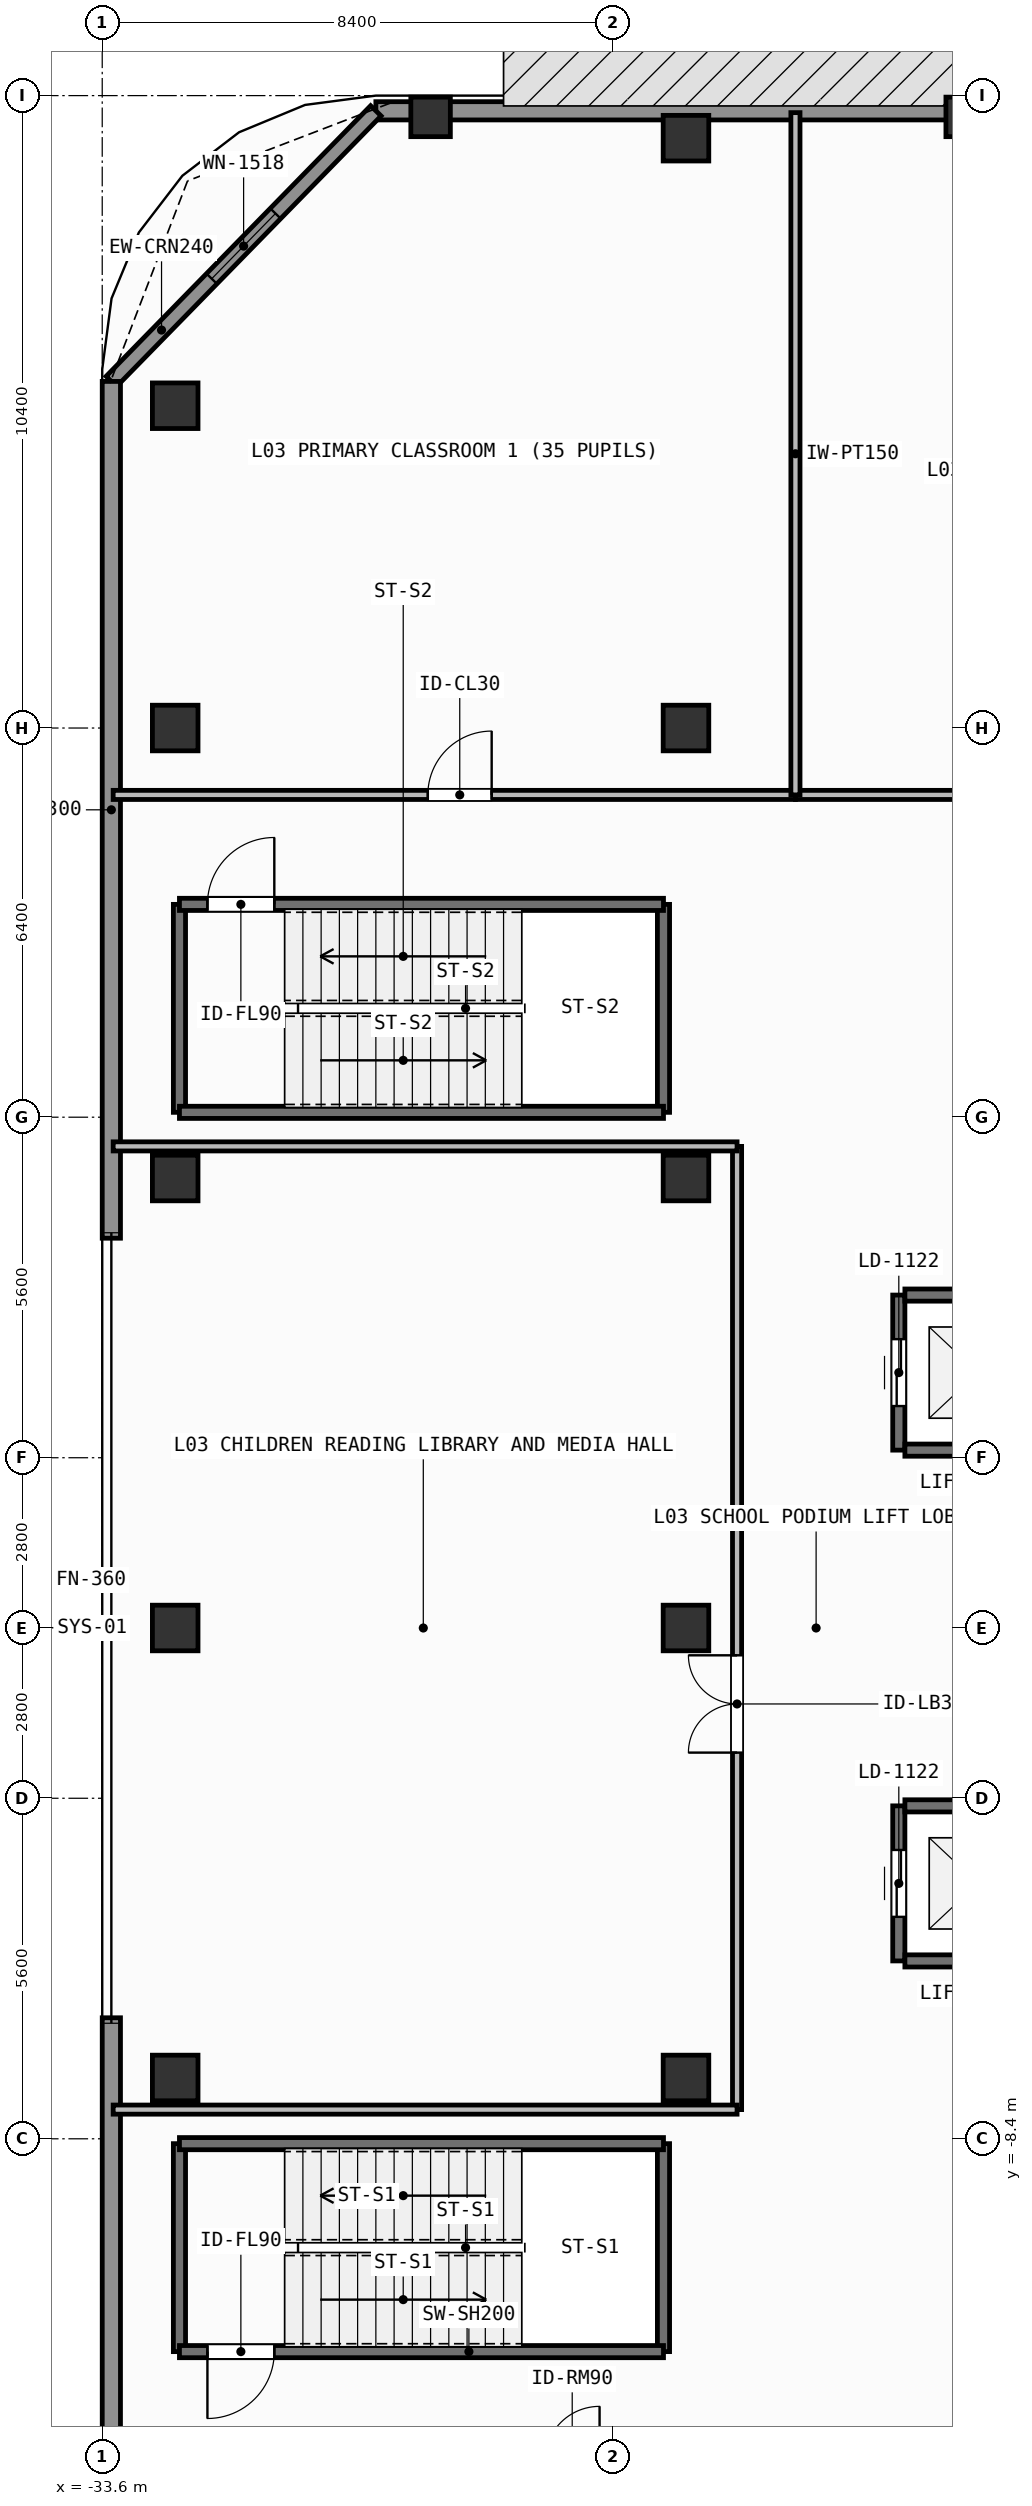
"""IFC4 building model, lengths in metres.
Left out: names, types, materials, properties, quantities, classifications, styles, units other than length and angle.
Written with IfcOpenShell. Run it as: python <this file> out.ifc"""

import sys

from ifc_helpers import new_model, si_unit, direction, frame, frame_2d, origin, origin_2d, place, context, subcontext, project, spatial, rectangle, extrude, element, fill, save


model = new_model("IFC4")
c1 = context("Model", 3, precision=1e-05, world=origin(), true_north=direction((0.0, 1.0)))
c2 = subcontext(c1, "Body", "Model", "MODEL_VIEW")
j1 = project(units=[si_unit("LENGTHUNIT", "METRE"), si_unit("PLANEANGLEUNIT", "RADIAN")], contexts=[c1])
p1 = place(None, origin())
s1 = spatial("IfcSite", under=j1, at=p1, CompositionType="ELEMENT")
p2 = place(p1, origin())
s2 = spatial("IfcBuilding", under=s1, at=p2, CompositionType="ELEMENT")
p3 = place(p2, frame((0.0, 0.0, 9.0)))
s3 = spatial("IfcBuildingStorey", under=s2, at=p3, CompositionType="ELEMENT", Elevation=9.0)
for number, where, z_axis, x_axis in (
    (1, (-32.4, -7.4, 0.0), (0.0, 0.0, 1.0), (1.0, 0.0, 0.0)),
    (2, (-32.4, 0.0, 0.0), (0.0, 0.0, 1.0), (1.0, 0.0, 0.0)),
    (3, (-32.4, 7.4, 0.0), (0.0, 0.0, 1.0), (1.0, 0.0, 0.0)),
    (4, (-32.4, 14.8, 0.0), (0.0, 0.0, 1.0), (1.0, 0.0, 0.0)),
    (5, (-24.0, -7.4, 0.0), (0.0, 0.0, 1.0), (1.0, 0.0, 0.0)),
    (6, (-24.0, 0.0, 0.0), (0.0, 0.0, 1.0), (1.0, 0.0, 0.0)),
    (7, (-24.0, 7.4, 0.0), (0.0, 0.0, 1.0), (1.0, 0.0, 0.0)),
    (8, (-24.0, 14.8, 0.0), (0.0, 0.0, 1.0), (1.0, 0.0, 0.0)),
    (9, (-24.0, 24.5, 0.0), (0.0, 0.0, 1.0), (1.0, 0.0, 0.0)),
    (10, (-32.4, 20.1, 0.0), (0.0, 0.0, 1.0), (1.0, 0.0, 0.0)),
):
    element("IfcColumn", number, at=place(p3, frame(where, z_axis=z_axis, x_axis=x_axis)), inside=s3, PredefinedType="COLUMN", context=c2, shape_type="SweptSolid", body=[
        extrude(rectangle(XDim=0.75, YDim=0.75, at=origin_2d()), origin(), (0.0, 0.0, 1.0), 4.2),
    ])
for number, where, z_axis, x_axis in (
    (11, (-28.2, 24.85, 0.0), (0.0, 0.0, 1.0), (1.0, 0.0, 0.0)),
    (12, (-19.4, 24.85, 0.0), (0.0, 0.0, 1.0), (1.0, 0.0, 0.0)),
):
    element("IfcColumn", number, at=place(p3, frame(where, z_axis=z_axis, x_axis=x_axis)), inside=s3, PredefinedType="PILASTER", context=c2, shape_type="SweptSolid", body=[
        extrude(rectangle(XDim=0.65, YDim=0.65, at=origin_2d()), origin(), (0.0, 0.0, 1.0), 4.2),
    ])
p4 = place(p3, frame((-29.1, 24.95, 0.0), z_axis=(0.0, 0.0, 1.0), x_axis=(1.0, 0.0, 0.0)))
e13 = element("IfcWall", 13, at=p4, inside=s3, PredefinedType="SOLIDWALL", context=c2, shape_type="SweptSolid", body=[
    extrude(rectangle(XDim=58.2, YDim=0.3, at=frame_2d((29.1, 0.0))), origin(), (0.0, 0.0, 1.0), 3.96),
])
p5 = place(p4, frame((24.35, 0.0, 0.85)))
e14 = element("IfcOpeningElement", 14, at=p5, cuts=e13, PredefinedType="OPENING", context=c2, shape_type="SweptSolid", body=[
    extrude(rectangle(XDim=2.1, YDim=2.2, at=frame_2d((1.05, 1.1))), frame((0.0, 0.16, 0.0), z_axis=(0.0, -1.0, 0.0), x_axis=(1.0, 0.0, 0.0)), (0.0, 0.0, 1.0), 0.32),
])
p6 = place(p4, frame((31.75, 0.0, 0.85)))
e15 = element("IfcOpeningElement", 15, at=p6, cuts=e13, PredefinedType="OPENING", context=c2, shape_type="SweptSolid", body=[
    extrude(rectangle(XDim=2.1, YDim=2.2, at=frame_2d((1.05, 1.1))), frame((0.0, 0.16, 0.0), z_axis=(0.0, -1.0, 0.0), x_axis=(1.0, 0.0, 0.0)), (0.0, 0.0, 1.0), 0.32),
])
p7 = place(p4, frame((40.625, 0.0, 0.85)))
e16 = element("IfcOpeningElement", 16, at=p7, cuts=e13, PredefinedType="OPENING", context=c2, shape_type="SweptSolid", body=[
    extrude(rectangle(XDim=2.1, YDim=2.2, at=frame_2d((1.05, 1.1))), frame((0.0, 0.16, 0.0), z_axis=(0.0, -1.0, 0.0), x_axis=(1.0, 0.0, 0.0)), (0.0, 0.0, 1.0), 0.32),
])
p8 = place(p4, frame((45.175, 0.0, 0.85)))
e17 = element("IfcOpeningElement", 17, at=p8, cuts=e13, PredefinedType="OPENING", context=c2, shape_type="SweptSolid", body=[
    extrude(rectangle(XDim=2.1, YDim=2.2, at=frame_2d((1.05, 1.1))), frame((0.0, 0.16, 0.0), z_axis=(0.0, -1.0, 0.0), x_axis=(1.0, 0.0, 0.0)), (0.0, 0.0, 1.0), 0.32),
])
p9 = place(p3, frame((-33.45, 20.5, 0.0), z_axis=(0.0, 0.0, 1.0), x_axis=(0.69901822973, 0.715103848756, 0.0)))
e18 = element("IfcWall", 18, at=p9, inside=s3, PredefinedType="SOLIDWALL", context=c2, shape_type="SweptSolid", body=[
    extrude(rectangle(XDim=6.223, YDim=0.24, at=frame_2d((3.111, 0.0))), origin(), (0.0, 0.0, 1.0), 3.96),
])
p10 = place(p9, frame((2.362, 0.0, 0.85)))
e19 = element("IfcOpeningElement", 19, at=p10, cuts=e18, PredefinedType="OPENING", context=c2, shape_type="SweptSolid", body=[
    extrude(rectangle(XDim=1.5, YDim=1.85, at=frame_2d((0.75, 0.925))), frame((0.0, 0.13, 0.0), z_axis=(0.0, -1.0, 0.0), x_axis=(1.0, 0.0, 0.0)), (0.0, 0.0, 1.0), 0.26),
])
for number, where, z_axis, x_axis in (
    (20, (-33.45, -20.5, 0.0), (0.0, 0.0, 1.0), (0.0, 1.0, 0.0)),
    (21, (-33.45, 6.41, 0.0), (0.0, 0.0, 1.0), (0.0, 1.0, 0.0)),
):
    element("IfcWall", number, at=place(p3, frame(where, z_axis=z_axis, x_axis=x_axis)), inside=s3, PredefinedType="SOLIDWALL", context=c2, shape_type="SweptSolid", body=[
        extrude(rectangle(XDim=14.09, YDim=0.3, at=frame_2d((7.045, 0.0))), origin(), (0.0, 0.0, 1.0), 3.96),
    ])
p11 = place(p3, frame((-20.5, -5.475, 0.0), z_axis=(0.0, 0.0, 1.0), x_axis=(0.0, 1.0, 0.0)))
e22 = element("IfcWall", 22, at=p11, inside=s3, PredefinedType="SHEAR", context=c2, shape_type="SweptSolid", body=[
    extrude(rectangle(XDim=2.55, YDim=0.2, at=frame_2d((1.275, 0.0))), origin(), (0.0, 0.0, 1.0), 3.96),
])
p12 = place(p11, frame((0.725, 0.0, 0.0)))
e23 = element("IfcOpeningElement", 23, at=p12, cuts=e22, PredefinedType="OPENING", context=c2, shape_type="SweptSolid", body=[
    extrude(rectangle(XDim=1.1, YDim=2.2, at=frame_2d((0.55, 1.1))), frame((0.0, 0.11, 0.0), z_axis=(0.0, -1.0, 0.0), x_axis=(1.0, 0.0, 0.0)), (0.0, 0.0, 1.0), 0.22),
])
for number, where, z_axis, x_axis in (
    (24, (-20.4, -5.475, 0.0), (0.0, 0.0, 1.0), (1.0, 0.0, 0.0)),
    (25, (-20.4, -2.925, 0.0), (0.0, 0.0, 1.0), (1.0, 0.0, 0.0)),
):
    element("IfcWall", number, at=place(p3, frame(where, z_axis=z_axis, x_axis=x_axis)), inside=s3, PredefinedType="SHEAR", context=c2, shape_type="SweptSolid", body=[
        extrude(rectangle(XDim=2.4, YDim=0.2, at=frame_2d((1.2, 0.0))), origin(), (0.0, 0.0, 1.0), 3.96),
    ])
p13 = place(p3, frame((-20.5, 2.925, 0.0), z_axis=(0.0, 0.0, 1.0), x_axis=(0.0, 1.0, 0.0)))
e26 = element("IfcWall", 26, at=p13, inside=s3, PredefinedType="SHEAR", context=c2, shape_type="SweptSolid", body=[
    extrude(rectangle(XDim=2.55, YDim=0.2, at=frame_2d((1.275, 0.0))), origin(), (0.0, 0.0, 1.0), 3.96),
])
p14 = place(p13, frame((0.725, 0.0, 0.0)))
e27 = element("IfcOpeningElement", 27, at=p14, cuts=e26, PredefinedType="OPENING", context=c2, shape_type="SweptSolid", body=[
    extrude(rectangle(XDim=1.1, YDim=2.2, at=frame_2d((0.55, 1.1))), frame((0.0, 0.11, 0.0), z_axis=(0.0, -1.0, 0.0), x_axis=(1.0, 0.0, 0.0)), (0.0, 0.0, 1.0), 0.22),
])
for number, where, z_axis, x_axis in (
    (28, (-20.4, 2.925, 0.0), (0.0, 0.0, 1.0), (1.0, 0.0, 0.0)),
    (29, (-20.4, 5.475, 0.0), (0.0, 0.0, 1.0), (1.0, 0.0, 0.0)),
):
    element("IfcWall", number, at=place(p3, frame(where, z_axis=z_axis, x_axis=x_axis)), inside=s3, PredefinedType="SHEAR", context=c2, shape_type="SweptSolid", body=[
        extrude(rectangle(XDim=2.4, YDim=0.2, at=frame_2d((1.2, 0.0))), origin(), (0.0, 0.0, 1.0), 3.96),
    ])
for number, where, z_axis, x_axis in (
    (30, (-32.33, -11.9, 0.0), (0.0, 0.0, 1.0), (0.0, 1.0, 0.0)),
    (31, (-24.37, -8.48, 0.0), (0.0, 0.0, 1.0), (0.0, -1.0, 0.0)),
):
    element("IfcWall", number, at=place(p3, frame(where, z_axis=z_axis, x_axis=x_axis)), inside=s3, PredefinedType="SHEAR", context=c2, shape_type="SweptSolid", body=[
        extrude(rectangle(XDim=3.42, YDim=0.2, at=frame_2d((1.71, 0.0))), origin(), (0.0, 0.0, 1.0), 3.96),
    ])
p15 = place(p3, frame((-24.37, -11.9, 0.0), z_axis=(0.0, 0.0, 1.0), x_axis=(-1.0, 0.0, 0.0)))
e32 = element("IfcWall", 32, at=p15, inside=s3, PredefinedType="SHEAR", context=c2, shape_type="SweptSolid", body=[
    extrude(rectangle(XDim=7.96, YDim=0.2, at=frame_2d((3.98, 0.0))), origin(), (0.0, 0.0, 1.0), 3.96),
])
p16 = place(p15, frame((6.4, 0.0, 0.0)))
e33 = element("IfcOpeningElement", 33, at=p16, cuts=e32, PredefinedType="OPENING", context=c2, shape_type="SweptSolid", body=[
    extrude(rectangle(XDim=1.1, YDim=2.15, at=frame_2d((0.55, 1.075))), frame((0.0, 0.11, 0.0), z_axis=(0.0, -1.0, 0.0), x_axis=(1.0, 0.0, 0.0)), (0.0, 0.0, 1.0), 0.22),
])
p17 = place(p3, frame((-32.33, -8.48, 0.0), z_axis=(0.0, 0.0, 1.0), x_axis=(1.0, 0.0, 0.0)))
e34 = element("IfcWall", 34, at=p17, inside=s3, PredefinedType="SHEAR", context=c2, shape_type="SweptSolid", body=[
    extrude(rectangle(XDim=7.96, YDim=0.2, at=frame_2d((3.98, 0.0))), origin(), (0.0, 0.0, 1.0), 3.96),
])
for number, where, z_axis, x_axis in (
    (35, (-32.33, 8.48, 0.0), (0.0, 0.0, 1.0), (0.0, 1.0, 0.0)),
    (36, (-24.37, 11.9, 0.0), (0.0, 0.0, 1.0), (0.0, -1.0, 0.0)),
):
    element("IfcWall", number, at=place(p3, frame(where, z_axis=z_axis, x_axis=x_axis)), inside=s3, PredefinedType="SHEAR", context=c2, shape_type="SweptSolid", body=[
        extrude(rectangle(XDim=3.42, YDim=0.2, at=frame_2d((1.71, 0.0))), origin(), (0.0, 0.0, 1.0), 3.96),
    ])
p18 = place(p3, frame((-24.37, 8.48, 0.0), z_axis=(0.0, 0.0, 1.0), x_axis=(-1.0, 0.0, 0.0)))
e37 = element("IfcWall", 37, at=p18, inside=s3, PredefinedType="SHEAR", context=c2, shape_type="SweptSolid", body=[
    extrude(rectangle(XDim=7.96, YDim=0.2, at=frame_2d((3.98, 0.0))), origin(), (0.0, 0.0, 1.0), 3.96),
])
p19 = place(p3, frame((-32.33, 11.9, 0.0), z_axis=(0.0, 0.0, 1.0), x_axis=(1.0, 0.0, 0.0)))
e38 = element("IfcWall", 38, at=p19, inside=s3, PredefinedType="SHEAR", context=c2, shape_type="SweptSolid", body=[
    extrude(rectangle(XDim=7.96, YDim=0.2, at=frame_2d((3.98, 0.0))), origin(), (0.0, 0.0, 1.0), 3.96),
])
p20 = place(p19, frame((0.46, 0.0, 0.0)))
e39 = element("IfcOpeningElement", 39, at=p20, cuts=e38, PredefinedType="OPENING", context=c2, shape_type="SweptSolid", body=[
    extrude(rectangle(XDim=1.1, YDim=2.15, at=frame_2d((0.55, 1.075))), frame((0.0, 0.11, 0.0), z_axis=(0.0, -1.0, 0.0), x_axis=(1.0, 0.0, 0.0)), (0.0, 0.0, 1.0), 0.22),
])
p21 = place(p3, frame((-33.42, 13.7, 0.0), z_axis=(0.0, 0.0, 1.0), x_axis=(1.0, 0.0, 0.0)))
e40 = element("IfcWall", 40, at=p21, inside=s3, PredefinedType="PARTITIONING", context=c2, shape_type="SweptSolid", body=[
    extrude(rectangle(XDim=11.22, YDim=0.15, at=frame_2d((5.61, 0.0))), origin(), (0.0, 0.0, 1.0), 3.96),
])
p22 = place(p21, frame((5.175, 0.0, 0.0)))
e41 = element("IfcOpeningElement", 41, at=p22, cuts=e40, PredefinedType="OPENING", context=c2, shape_type="SweptSolid", body=[
    extrude(rectangle(XDim=1.05, YDim=2.2, at=frame_2d((0.525, 1.1))), frame((0.0, 0.085, 0.0), z_axis=(0.0, -1.0, 0.0), x_axis=(1.0, 0.0, 0.0)), (0.0, 0.0, 1.0), 0.17),
])
p23 = place(p3, frame((-22.2, 13.7, 0.0), z_axis=(0.0, 0.0, 1.0), x_axis=(1.0, 0.0, 0.0)))
e42 = element("IfcWall", 42, at=p23, inside=s3, PredefinedType="PARTITIONING", context=c2, shape_type="SweptSolid", body=[
    extrude(rectangle(XDim=11.0, YDim=0.15, at=frame_2d((5.5, 0.0))), origin(), (0.0, 0.0, 1.0), 3.96),
])
p24 = place(p23, frame((4.975, 0.0, 0.0)))
e43 = element("IfcOpeningElement", 43, at=p24, cuts=e42, PredefinedType="OPENING", context=c2, shape_type="SweptSolid", body=[
    extrude(rectangle(XDim=1.05, YDim=2.2, at=frame_2d((0.525, 1.1))), frame((0.0, 0.085, 0.0), z_axis=(0.0, -1.0, 0.0), x_axis=(1.0, 0.0, 0.0)), (0.0, 0.0, 1.0), 0.17),
])
p25 = place(p3, frame((-23.16, -7.92, 0.0), z_axis=(0.0, 0.0, 1.0), x_axis=(0.0, 1.0, 0.0)))
e44 = element("IfcWall", 44, at=p25, inside=s3, PredefinedType="PARTITIONING", context=c2, shape_type="SweptSolid", body=[
    extrude(rectangle(XDim=15.84, YDim=0.15, at=frame_2d((7.92, 0.0))), origin(), (0.0, 0.0, 1.0), 3.96),
])
p26 = place(p25, frame((5.871, 0.0, 0.0)))
e45 = element("IfcOpeningElement", 45, at=p26, cuts=e44, PredefinedType="OPENING", context=c2, shape_type="SweptSolid", body=[
    extrude(rectangle(XDim=1.6, YDim=2.3, at=frame_2d((0.8, 1.15))), frame((0.0, 0.085, 0.0), z_axis=(0.0, -1.0, 0.0), x_axis=(1.0, 0.0, 0.0)), (0.0, 0.0, 1.0), 0.17),
])
p27 = place(p3, frame((-22.2, 13.7, 0.0), z_axis=(0.0, 0.0, 1.0), x_axis=(0.0, 1.0, 0.0)))
e46 = element("IfcWall", 46, at=p27, inside=s3, PredefinedType="PARTITIONING", context=c2, shape_type="SweptSolid", body=[
    extrude(rectangle(XDim=11.22, YDim=0.15, at=frame_2d((5.61, 0.0))), origin(), (0.0, 0.0, 1.0), 3.96),
])
for number, where, z_axis, x_axis in (
    (47, (-33.42, -7.92, 0.0), (0.0, 0.0, 1.0), (1.0, 0.0, 0.0)),
    (48, (-33.42, 7.92, 0.0), (0.0, 0.0, 1.0), (1.0, 0.0, 0.0)),
):
    element("IfcWall", number, at=place(p3, frame(where, z_axis=z_axis, x_axis=x_axis)), inside=s3, PredefinedType="PARTITIONING", context=c2, shape_type="SweptSolid", body=[
        extrude(rectangle(XDim=10.26, YDim=0.15, at=frame_2d((5.13, 0.0))), origin(), (0.0, 0.0, 1.0), 3.96),
    ])
p28 = place(p10, origin())
e49 = element("IfcWindow", 49, at=p28, inside=s3, PartitioningType="SINGLE_PANEL", PredefinedType="WINDOW", context=c2, shape_type="SweptSolid", body=[
    extrude(rectangle(XDim=1.5, YDim=1.85, at=frame_2d((0.75, 0.925))), frame((0.0, 0.03, 0.0), z_axis=(0.0, -1.0, 0.0), x_axis=(1.0, 0.0, 0.0)), (0.0, 0.0, 1.0), 0.06),
])
fill(e19, e49)
p29 = place(p12, origin())
e50 = element("IfcDoor", 50, at=p29, inside=s3, OperationType="SLIDING_TO_LEFT", PredefinedType="DOOR", context=c2, shape_type="SweptSolid", body=[
    extrude(rectangle(XDim=1.1, YDim=2.2, at=frame_2d((0.55, 1.1))), frame((0.0, 0.025, 0.0), z_axis=(0.0, -1.0, 0.0), x_axis=(1.0, 0.0, 0.0)), (0.0, 0.0, 1.0), 0.05),
])
fill(e23, e50)
p30 = place(p14, origin())
e51 = element("IfcDoor", 51, at=p30, inside=s3, OperationType="SLIDING_TO_LEFT", PredefinedType="DOOR", context=c2, shape_type="SweptSolid", body=[
    extrude(rectangle(XDim=1.1, YDim=2.2, at=frame_2d((0.55, 1.1))), frame((0.0, 0.025, 0.0), z_axis=(0.0, -1.0, 0.0), x_axis=(1.0, 0.0, 0.0)), (0.0, 0.0, 1.0), 0.05),
])
fill(e27, e51)
p31 = place(p16, origin())
e52 = element("IfcDoor", 52, at=p31, inside=s3, OperationType="SINGLE_SWING_RIGHT", PredefinedType="DOOR", context=c2, shape_type="SweptSolid", body=[
    extrude(rectangle(XDim=1.1, YDim=2.15, at=frame_2d((0.55, 1.075))), frame((0.0, 0.025, 0.0), z_axis=(0.0, -1.0, 0.0), x_axis=(1.0, 0.0, 0.0)), (0.0, 0.0, 1.0), 0.05),
])
fill(e33, e52)
p32 = place(p20, origin())
e53 = element("IfcDoor", 53, at=p32, inside=s3, OperationType="SINGLE_SWING_RIGHT", PredefinedType="DOOR", context=c2, shape_type="SweptSolid", body=[
    extrude(rectangle(XDim=1.1, YDim=2.15, at=frame_2d((0.55, 1.075))), frame((0.0, 0.025, 0.0), z_axis=(0.0, -1.0, 0.0), x_axis=(1.0, 0.0, 0.0)), (0.0, 0.0, 1.0), 0.05),
])
fill(e39, e53)
p33 = place(p22, origin())
e54 = element("IfcDoor", 54, at=p33, inside=s3, OperationType="SINGLE_SWING_RIGHT", PredefinedType="DOOR", context=c2, shape_type="SweptSolid", body=[
    extrude(rectangle(XDim=1.05, YDim=2.2, at=frame_2d((0.525, 1.1))), frame((0.0, 0.025, 0.0), z_axis=(0.0, -1.0, 0.0), x_axis=(1.0, 0.0, 0.0)), (0.0, 0.0, 1.0), 0.05),
])
fill(e41, e54)
p34 = place(p26, origin())
e55 = element("IfcDoor", 55, at=p34, inside=s3, OperationType="SINGLE_SWING_LEFT", PredefinedType="DOOR", context=c2, shape_type="SweptSolid", body=[
    extrude(rectangle(XDim=1.6, YDim=2.3, at=frame_2d((0.8, 1.15))), frame((0.0, 0.025, 0.0), z_axis=(0.0, -1.0, 0.0), x_axis=(1.0, 0.0, 0.0)), (0.0, 0.0, 1.0), 0.05),
])
fill(e45, e55)
save(model, sys.argv[1])
